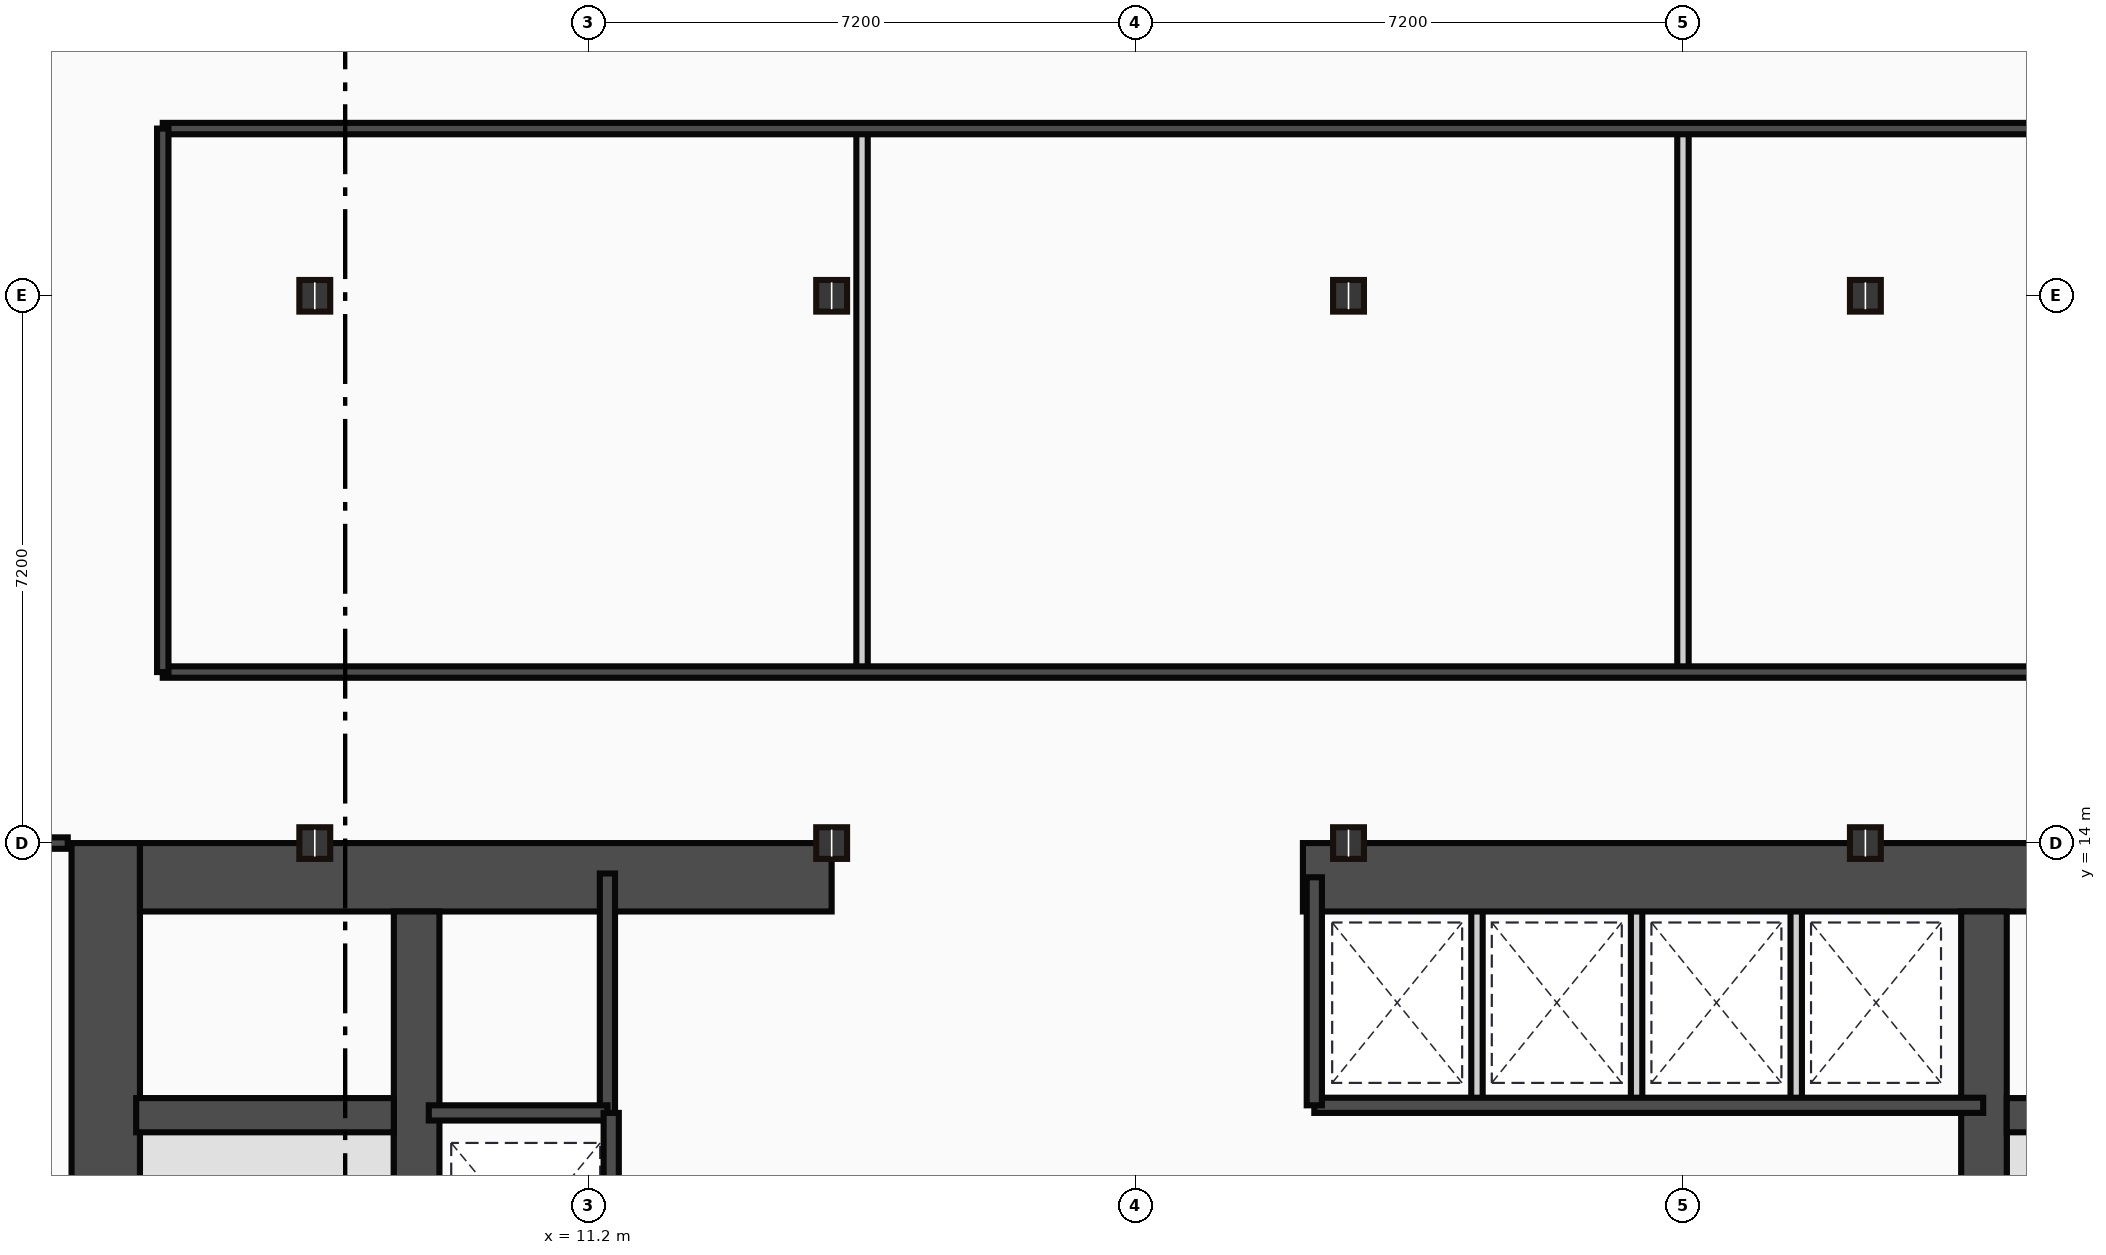
"""IFC4 building model, lengths in metres.
Left out: names, types, materials, properties, quantities, classifications, styles, units other than length and angle.
Written with IfcOpenShell. Run it as: python <this file> out.ifc"""

import sys

from ifc_helpers import new_model, si_unit, direction, frame, frame_2d, origin, origin_2d, place, context, subcontext, project, spatial, rectangle, i_section, extrude, source, transform, mapped, element, fill, save


model = new_model("IFC4")
c1 = context("Model", 3, precision=1e-05, world=origin(), true_north=direction((0.0, 1.0)))
c2 = subcontext(c1, "Body", "Model", "MODEL_VIEW")
j1 = project(units=[si_unit("LENGTHUNIT", "METRE"), si_unit("PLANEANGLEUNIT", "RADIAN")], contexts=[c1])
p1 = place(None, origin())
s1 = spatial("IfcSite", under=j1, at=p1, CompositionType="ELEMENT")
p2 = place(p1, origin())
s2 = spatial("IfcBuilding", under=s1, at=p2, CompositionType="ELEMENT")
p3 = place(p2, frame((0.0, 0.0, 32.5)))
s3 = spatial("IfcBuildingStorey", under=s2, at=p3, CompositionType="ELEMENT", Elevation=32.5)
m1 = source(origin(), c2, "Body", "SweptSolid", [
    extrude(rectangle(XDim=13.1, YDim=0.9, at=frame_2d((6.55, 0.0))), origin(), (0.0, 0.0, 1.0), 3.65),
])
p4 = place(p3, frame((4.85, 0.9, 0.0), z_axis=(0.0, 0.0, 1.0), x_axis=(0.0, 1.0, 0.0)))
e1 = element("IfcWall", 1, at=p4, inside=s3, PredefinedType="SHEAR", context=c2, shape_type="MappedRepresentation", body=[
    mapped(m1, transform((0.0, 0.0, 0.0))),
])
m2 = source(origin(), c2, "Body", "SweptSolid", [
    extrude(rectangle(XDim=9.1, YDim=0.9, at=frame_2d((4.55, 0.0))), origin(), (0.0, 0.0, 1.0), 3.65),
])
p5 = place(p3, frame((5.3, 13.55, 0.0), z_axis=(0.0, 0.0, 1.0), x_axis=(1.0, 0.0, 0.0)))
e2 = element("IfcWall", 2, at=p5, inside=s3, PredefinedType="SHEAR", context=c2, shape_type="MappedRepresentation", body=[
    mapped(m2, transform((0.0, 0.0, 0.0))),
])
p6 = place(p5, frame((4.1, 0.0, 0.0)))
e3 = element("IfcOpeningElement", 3, at=p6, cuts=e2, PredefinedType="OPENING", context=c2, shape_type="SweptSolid", body=[
    extrude(rectangle(XDim=1.1, YDim=2.15, at=frame_2d((0.55, 1.075))), frame((0.0, 0.46, 0.0), z_axis=(0.0, -1.0, 0.0), x_axis=(1.0, 0.0, 0.0)), (0.0, 0.0, 1.0), 0.92),
])
m3 = source(origin(), c2, "Body", "SweptSolid", [
    extrude(rectangle(XDim=12.6, YDim=0.9, at=frame_2d((6.3, 0.0))), origin(), (0.0, 0.0, 1.0), 3.65),
])
p7 = place(p3, frame((20.6, 13.55, 0.0), z_axis=(0.0, 0.0, 1.0), x_axis=(1.0, 0.0, 0.0)))
e4 = element("IfcWall", 4, at=p7, inside=s3, PredefinedType="SHEAR", context=c2, shape_type="MappedRepresentation", body=[
    mapped(m3, transform((0.0, 0.0, 0.0))),
])
p8 = place(p7, frame((9.25, 0.0, 0.0)))
e5 = element("IfcOpeningElement", 5, at=p8, cuts=e4, PredefinedType="OPENING", context=c2, shape_type="SweptSolid", body=[
    extrude(rectangle(XDim=1.1, YDim=2.15, at=frame_2d((0.55, 1.075))), frame((0.0, 0.46, 0.0), z_axis=(0.0, -1.0, 0.0), x_axis=(1.0, 0.0, 0.0)), (0.0, 0.0, 1.0), 0.92),
])
m4 = source(origin(), c2, "Body", "SweptSolid", [
    extrude(rectangle(XDim=12.2, YDim=0.6, at=frame_2d((6.1, 0.0))), origin(), (0.0, 0.0, 1.0), 3.65),
])
for number, where, z_axis, x_axis in (
    (6, (8.94, 0.9, 0.0), (0.0, 0.0, 1.0), (0.0, 1.0, 0.0)),
    (7, (29.56, 0.9, 0.0), (0.0, 0.0, 1.0), (0.0, 1.0, 0.0)),
):
    element("IfcWall", number, at=place(p3, frame(where, z_axis=z_axis, x_axis=x_axis)), inside=s3, PredefinedType="SHEAR", context=c2, shape_type="MappedRepresentation", body=[
        mapped(m4, transform((0.0, 0.0, 0.0))),
    ])
m5 = source(origin(), c2, "Body", "SweptSolid", [
    extrude(rectangle(XDim=3.39, YDim=0.45, at=frame_2d((1.695, 0.0))), origin(), (0.0, 0.0, 1.0), 3.65),
])
p9 = place(p3, frame((5.25, 10.42, 0.0), z_axis=(0.0, 0.0, 1.0), x_axis=(1.0, 0.0, 0.0)))
e8 = element("IfcWall", 8, at=p9, inside=s3, PredefinedType="SHEAR", context=c2, shape_type="MappedRepresentation", body=[
    mapped(m5, transform((0.0, 0.0, 0.0))),
])
p10 = place(p9, frame((1.05, 0.0, 0.0)))
e9 = element("IfcOpeningElement", 9, at=p10, cuts=e8, PredefinedType="OPENING", context=c2, shape_type="SweptSolid", body=[
    extrude(rectangle(XDim=1.1, YDim=2.15, at=frame_2d((0.55, 1.075))), frame((0.0, 0.235, 0.0), z_axis=(0.0, -1.0, 0.0), x_axis=(1.0, 0.0, 0.0)), (0.0, 0.0, 1.0), 0.47),
])
p11 = place(p3, frame((29.86, 10.42, 0.0), z_axis=(0.0, 0.0, 1.0), x_axis=(1.0, 0.0, 0.0)))
e10 = element("IfcWall", 10, at=p11, inside=s3, PredefinedType="SHEAR", context=c2, shape_type="MappedRepresentation", body=[
    mapped(m5, transform((0.0, 0.0, 0.0))),
])
p12 = place(p11, frame((1.1, 0.0, 0.0)))
e11 = element("IfcOpeningElement", 11, at=p12, cuts=e10, PredefinedType="OPENING", context=c2, shape_type="SweptSolid", body=[
    extrude(rectangle(XDim=1.1, YDim=2.15, at=frame_2d((0.55, 1.075))), frame((0.0, 0.235, 0.0), z_axis=(0.0, -1.0, 0.0), x_axis=(1.0, 0.0, 0.0)), (0.0, 0.0, 1.0), 0.47),
])
m6 = source(origin(), c2, "Body", "SweptSolid", [
    extrude(i_section(OverallWidth=0.406, OverallDepth=0.416, WebThickness=0.03, FlangeThickness=0.048, at=origin_2d()), origin(), (0.0, 0.0, 1.0), 3.65),
])
for number, where, z_axis, x_axis in (
    (12, (7.6, 14.0, 0.0), (0.0, 0.0, 1.0), (1.0, 0.0, 0.0)),
    (13, (7.6, 21.2, 0.0), (0.0, 0.0, 1.0), (1.0, 0.0, 0.0)),
    (14, (14.4, 14.0, 0.0), (0.0, 0.0, 1.0), (1.0, 0.0, 0.0)),
    (15, (14.4, 21.2, 0.0), (0.0, 0.0, 1.0), (1.0, 0.0, 0.0)),
    (16, (21.2, 14.0, 0.0), (0.0, 0.0, 1.0), (1.0, 0.0, 0.0)),
    (17, (21.2, 21.2, 0.0), (0.0, 0.0, 1.0), (1.0, 0.0, 0.0)),
    (18, (28.0, 14.0, 0.0), (0.0, 0.0, 1.0), (1.0, 0.0, 0.0)),
    (19, (28.0, 21.2, 0.0), (0.0, 0.0, 1.0), (1.0, 0.0, 0.0)),
):
    element("IfcColumn", number, at=place(p3, frame(where, z_axis=z_axis, x_axis=x_axis)), inside=s3, PredefinedType="COLUMN", context=c2, shape_type="MappedRepresentation", body=[
        mapped(m6, transform((0.0, 0.0, 0.0))),
    ])
m7 = source(origin(), c2, "Body", "SweptSolid", [
    extrude(rectangle(XDim=3.18, YDim=0.2, at=frame_2d((1.59, 0.0))), origin(), (0.0, 0.0, 1.0), 3.4),
])
p13 = place(p3, frame((11.45, 10.42, 0.0), z_axis=(0.0, 0.0, 1.0), x_axis=(0.0, 1.0, 0.0)))
e20 = element("IfcWall", 20, at=p13, inside=s3, PredefinedType="PARTITIONING", context=c2, shape_type="MappedRepresentation", body=[
    mapped(m7, transform((0.0, 0.0, 0.0))),
])
m8 = source(origin(), c2, "Body", "SweptSolid", [
    extrude(rectangle(XDim=2.35, YDim=0.2, at=frame_2d((1.175, 0.0))), origin(), (0.0, 0.0, 1.0), 3.4),
])
p14 = place(p3, frame((9.1, 10.45, 0.0), z_axis=(0.0, 0.0, 1.0), x_axis=(1.0, 0.0, 0.0)))
e21 = element("IfcWall", 21, at=p14, inside=s3, PredefinedType="PARTITIONING", context=c2, shape_type="MappedRepresentation", body=[
    mapped(m8, transform((0.0, 0.0, 0.0))),
])
p15 = place(p14, frame((0.55, 0.0, 0.0)))
e22 = element("IfcOpeningElement", 22, at=p15, cuts=e21, PredefinedType="OPENING", context=c2, shape_type="SweptSolid", body=[
    extrude(rectangle(XDim=1.1, YDim=2.15, at=frame_2d((0.55, 1.075))), frame((0.0, 0.11, 0.0), z_axis=(0.0, -1.0, 0.0), x_axis=(1.0, 0.0, 0.0)), (0.0, 0.0, 1.0), 0.22),
])
m9 = source(origin(), c2, "Body", "SweptSolid", [
    extrude(rectangle(XDim=9.6, YDim=0.2, at=frame_2d((4.8, 0.0))), origin(), (0.0, 0.0, 1.0), 3.4),
])
p16 = place(p3, frame((11.5, 0.85, 0.0), z_axis=(0.0, 0.0, 1.0), x_axis=(0.0, 1.0, 0.0)))
e23 = element("IfcWall", 23, at=p16, inside=s3, PredefinedType="PARTITIONING", context=c2, shape_type="MappedRepresentation", body=[
    mapped(m9, transform((0.0, 0.0, 0.0))),
])
p17 = place(p16, frame((4.2, 0.0, 0.0)))
e24 = element("IfcOpeningElement", 24, at=p17, cuts=e23, PredefinedType="OPENING", context=c2, shape_type="SweptSolid", body=[
    extrude(rectangle(XDim=1.1, YDim=2.15, at=frame_2d((0.55, 1.075))), frame((0.0, 0.11, 0.0), z_axis=(0.0, -1.0, 0.0), x_axis=(1.0, 0.0, 0.0)), (0.0, 0.0, 1.0), 0.22),
])
p18 = place(p16, frame((0.9, 0.0, 0.0)))
e25 = element("IfcOpeningElement", 25, at=p18, cuts=e23, PredefinedType="OPENING", context=c2, shape_type="SweptSolid", body=[
    extrude(rectangle(XDim=1.2, YDim=2.15, at=frame_2d((0.6, 1.075))), frame((0.0, 0.11, 0.0), z_axis=(0.0, -1.0, 0.0), x_axis=(1.0, 0.0, 0.0)), (0.0, 0.0, 1.0), 0.22),
])
m10 = source(origin(), c2, "Body", "SweptSolid", [
    extrude(rectangle(XDim=8.8, YDim=0.2, at=frame_2d((4.4, 0.0))), origin(), (0.0, 0.0, 1.0), 3.4),
])
p19 = place(p3, frame((20.75, 10.55, 0.0), z_axis=(0.0, 0.0, 1.0), x_axis=(1.0, 0.0, 0.0)))
e26 = element("IfcWall", 26, at=p19, inside=s3, PredefinedType="PARTITIONING", context=c2, shape_type="MappedRepresentation", body=[
    mapped(m10, transform((0.0, 0.0, 0.0))),
])
m11 = source(origin(), c2, "Body", "SweptSolid", [
    extrude(rectangle(XDim=3.0, YDim=0.2, at=frame_2d((1.5, 0.0))), origin(), (0.0, 0.0, 1.0), 3.4),
])
p20 = place(p3, frame((20.75, 10.55, 0.0), z_axis=(0.0, 0.0, 1.0), x_axis=(0.0, 1.0, 0.0)))
e27 = element("IfcWall", 27, at=p20, inside=s3, PredefinedType="PARTITIONING", context=c2, shape_type="MappedRepresentation", body=[
    mapped(m11, transform((0.0, 0.0, 0.0))),
])
m12 = source(origin(), c2, "Body", "SweptSolid", [
    extrude(rectangle(XDim=2.85, YDim=0.15, at=frame_2d((1.425, 0.0))), origin(), (0.0, 0.0, 1.0), 3.4),
])
for number, where, z_axis, x_axis in (
    (28, (22.89, 10.6, 0.0), (0.0, 0.0, 1.0), (0.0, 1.0, 0.0)),
    (29, (24.99, 10.6, 0.0), (0.0, 0.0, 1.0), (0.0, 1.0, 0.0)),
    (30, (27.09, 10.6, 0.0), (0.0, 0.0, 1.0), (0.0, 1.0, 0.0)),
):
    element("IfcWall", number, at=place(p3, frame(where, z_axis=z_axis, x_axis=x_axis)), inside=s3, PredefinedType="PARTITIONING", context=c2, shape_type="MappedRepresentation", body=[
        mapped(m12, transform((0.0, 0.0, 0.0))),
    ])
m13 = source(origin(), c2, "Body", "SweptSolid", [
    extrude(rectangle(XDim=0.95, YDim=0.15, at=frame_2d((0.475, 0.0))), origin(), (0.0, 0.0, 1.0), 2.625),
])
p21 = place(p3, frame((4.35, 14.0, 0.0), z_axis=(0.0, 0.0, 1.0), x_axis=(-1.0, 0.0, 0.0)))
e31 = element("IfcWall", 31, at=p21, inside=s3, PredefinedType="PARTITIONING", context=c2, shape_type="MappedRepresentation", body=[
    mapped(m13, transform((0.0, 0.0, 0.0))),
])
m14 = source(origin(), c2, "Body", "SweptSolid", [
    extrude(rectangle(XDim=38.8, YDim=0.15, at=frame_2d((19.4, 0.0))), origin(), (0.0, 0.0, 1.0), 3.4),
])
p22 = place(p3, frame((5.6, 16.25, 0.0), z_axis=(0.0, 0.0, 1.0), x_axis=(1.0, 0.0, 0.0)))
e32 = element("IfcWall", 32, at=p22, inside=s3, PredefinedType="PARTITIONING", context=c2, shape_type="MappedRepresentation", body=[
    mapped(m14, transform((0.0, 0.0, 0.0))),
])
p23 = place(p22, frame((4.255, 0.0, 0.0)))
e33 = element("IfcOpeningElement", 33, at=p23, cuts=e32, PredefinedType="OPENING", context=c2, shape_type="SweptSolid", body=[
    extrude(rectangle(XDim=0.95, YDim=2.15, at=frame_2d((0.475, 1.075))), frame((0.0, 0.085, 0.0), z_axis=(0.0, -1.0, 0.0), x_axis=(1.0, 0.0, 0.0)), (0.0, 0.0, 1.0), 0.17),
])
p24 = place(p22, frame((14.125, 0.0, 0.0)))
e34 = element("IfcOpeningElement", 34, at=p24, cuts=e32, PredefinedType="OPENING", context=c2, shape_type="SweptSolid", body=[
    extrude(rectangle(XDim=0.95, YDim=2.15, at=frame_2d((0.475, 1.075))), frame((0.0, 0.085, 0.0), z_axis=(0.0, -1.0, 0.0), x_axis=(1.0, 0.0, 0.0)), (0.0, 0.0, 1.0), 0.17),
])
m15 = source(origin(), c2, "Body", "SweptSolid", [
    extrude(rectangle(XDim=38.8, YDim=0.15, at=frame_2d((19.4, 0.0))), origin(), (0.0, 0.0, 1.0), 2.978),
])
p25 = place(p3, frame((44.4, 23.4, 0.0), z_axis=(0.0, 0.0, 1.0), x_axis=(-1.0, 0.0, 0.0)))
e35 = element("IfcWall", 35, at=p25, inside=s3, PredefinedType="PARTITIONING", context=c2, shape_type="MappedRepresentation", body=[
    mapped(m15, transform((0.0, 0.0, 0.0))),
])
p26 = place(p25, frame((12.925, 0.0, 0.0)))
e36 = element("IfcOpeningElement", 36, at=p26, cuts=e35, PredefinedType="OPENING", context=c2, shape_type="SweptSolid", body=[
    extrude(rectangle(XDim=0.95, YDim=2.15, at=frame_2d((0.475, 1.075))), frame((0.0, 0.085, 0.0), z_axis=(0.0, -1.0, 0.0), x_axis=(1.0, 0.0, 0.0)), (0.0, 0.0, 1.0), 0.17),
])
p27 = place(p25, frame((3.655, 0.0, 0.0)))
e37 = element("IfcOpeningElement", 37, at=p27, cuts=e35, PredefinedType="OPENING", context=c2, shape_type="SweptSolid", body=[
    extrude(rectangle(XDim=0.95, YDim=2.15, at=frame_2d((0.475, 1.075))), frame((0.0, 0.085, 0.0), z_axis=(0.0, -1.0, 0.0), x_axis=(1.0, 0.0, 0.0)), (0.0, 0.0, 1.0), 0.17),
])
m16 = source(origin(), c2, "Body", "SweptSolid", [
    extrude(rectangle(XDim=7.15, YDim=0.15, at=frame_2d((3.575, 0.0))), origin(), (0.0, 0.0, 1.0), 3.4),
])
for number, where, z_axis, x_axis in (
    (38, (5.6, 23.4, 0.0), (0.0, 0.0, 1.0), (0.0, -1.0, 0.0)),
    (39, (14.8, 23.4, 0.0), (0.0, 0.0, 1.0), (0.0, -1.0, 0.0)),
    (40, (25.6, 23.4, 0.0), (0.0, 0.0, 1.0), (0.0, -1.0, 0.0)),
):
    element("IfcWall", number, at=place(p3, frame(where, z_axis=z_axis, x_axis=x_axis)), inside=s3, PredefinedType="PARTITIONING", context=c2, shape_type="MappedRepresentation", body=[
        mapped(m16, transform((0.0, 0.0, 0.0))),
    ])
m17 = source(origin(), c2, "Body", "SweptSolid", [
    extrude(rectangle(XDim=1.1, YDim=2.15, at=frame_2d((0.55, 1.075))), frame((0.0, 0.025, 0.0), z_axis=(0.0, -1.0, 0.0), x_axis=(1.0, 0.0, 0.0)), (0.0, 0.0, 1.0), 0.05),
])
p28 = place(p10, frame((1.1, 0.0, 0.0), z_axis=(0.0, 0.0, 1.0), x_axis=(-1.0, 0.0, 0.0)))
e41 = element("IfcDoor", 41, at=p28, inside=s3, OperationType="SINGLE_SWING_LEFT", PredefinedType="DOOR", context=c2, shape_type="MappedRepresentation", body=[
    mapped(m17, transform((0.0, 0.0, 0.0))),
])
fill(e9, e41)
p29 = place(p6, origin())
e42 = element("IfcDoor", 42, at=p29, inside=s3, OperationType="SINGLE_SWING_RIGHT", PredefinedType="DOOR", context=c2, shape_type="MappedRepresentation", body=[
    mapped(m17, transform((0.0, 0.0, 0.0))),
])
fill(e3, e42)
p30 = place(p8, origin())
e43 = element("IfcDoor", 43, at=p30, inside=s3, OperationType="SINGLE_SWING_LEFT", PredefinedType="DOOR", context=c2, shape_type="MappedRepresentation", body=[
    mapped(m17, transform((0.0, 0.0, 0.0))),
])
fill(e5, e43)
p31 = place(p15, origin())
e44 = element("IfcDoor", 44, at=p31, inside=s3, OperationType="SLIDING_TO_LEFT", PredefinedType="DOOR", context=c2, shape_type="MappedRepresentation", body=[
    mapped(m17, transform((0.0, 0.0, 0.0))),
])
fill(e22, e44)
m18 = source(origin(), c2, "Body", "SweptSolid", [
    extrude(rectangle(XDim=0.95, YDim=2.15, at=frame_2d((0.475, 1.075))), frame((0.0, 0.025, 0.0), z_axis=(0.0, -1.0, 0.0), x_axis=(1.0, 0.0, 0.0)), (0.0, 0.0, 1.0), 0.05),
])
p32 = place(p23, origin())
e45 = element("IfcDoor", 45, at=p32, inside=s3, OperationType="SINGLE_SWING_RIGHT", PredefinedType="DOOR", context=c2, shape_type="MappedRepresentation", body=[
    mapped(m18, transform((0.0, 0.0, 0.0))),
])
fill(e33, e45)
p33 = place(p24, origin())
e46 = element("IfcDoor", 46, at=p33, inside=s3, OperationType="SINGLE_SWING_RIGHT", PredefinedType="DOOR", context=c2, shape_type="MappedRepresentation", body=[
    mapped(m18, transform((0.0, 0.0, 0.0))),
])
fill(e34, e46)
save(model, sys.argv[1])
